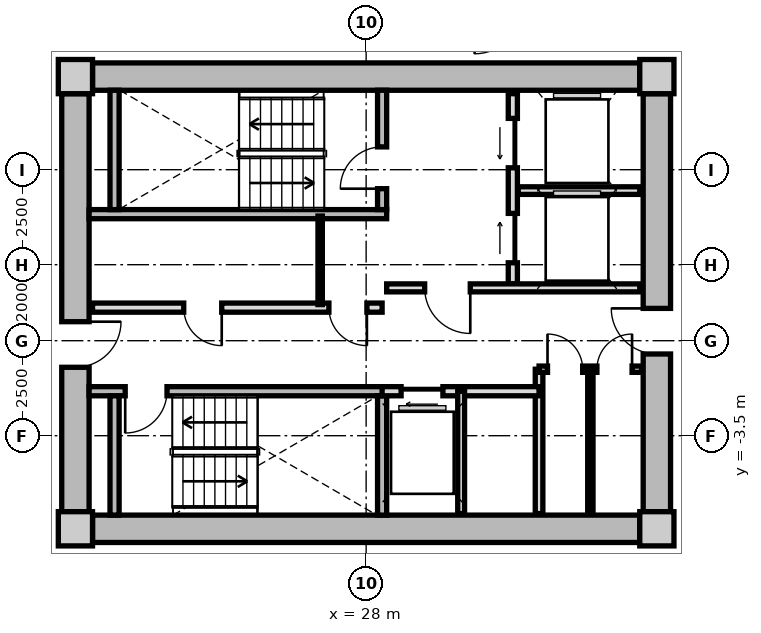
"""IFC4 building model, lengths in metres.
Left out: names, types, materials, properties, quantities, classifications, styles, units other than length and angle.
Written with IfcOpenShell. Run it as: python <this file> out.ifc"""

import sys

from ifc_helpers import new_model, si_unit, direction, frame, frame_2d, origin, origin_2d, place, context, subcontext, project, spatial, rectangle, extrude, source, transform, mapped, element, fill, save


model = new_model("IFC4")
c1 = context("Model", 3, precision=1e-05, world=origin(), true_north=direction((0.0, 1.0)))
c2 = subcontext(c1, "Body", "Model", "MODEL_VIEW")
j1 = project(units=[si_unit("LENGTHUNIT", "METRE"), si_unit("PLANEANGLEUNIT", "RADIAN")], contexts=[c1])
p1 = place(None, origin())
s1 = spatial("IfcSite", under=j1, at=p1, CompositionType="ELEMENT")
p2 = place(p1, origin())
s2 = spatial("IfcBuilding", under=s1, at=p2, CompositionType="ELEMENT")
p3 = place(p2, frame((0.0, 0.0, 123.7)))
s3 = spatial("IfcBuildingStorey", under=s2, at=p3, CompositionType="ELEMENT", Elevation=123.7)
m1 = source(origin(), c2, "Body", "SweptSolid", [
    extrude(rectangle(XDim=0.9, YDim=0.9, at=origin_2d()), origin(), (0.0, 0.0, 1.0), 3.05),
])
for number, where, z_axis, x_axis in (
    (1, (20.35, -5.95, 0.0), (0.0, 0.0, 1.0), (1.0, 0.0, 0.0)),
    (2, (35.65, -5.95, 0.0), (0.0, 0.0, 1.0), (1.0, 0.0, 0.0)),
    (3, (35.65, 5.95, 0.0), (0.0, 0.0, 1.0), (1.0, 0.0, 0.0)),
    (4, (20.35, 5.95, 0.0), (0.0, 0.0, 1.0), (1.0, 0.0, 0.0)),
):
    element("IfcColumn", number, at=place(p3, frame(where, z_axis=z_axis, x_axis=x_axis)), inside=s3, PredefinedType="COLUMN", context=c2, shape_type="MappedRepresentation", body=[
        mapped(m1, transform((0.0, 0.0, 0.0), x_axis=(1.0, 0.0, 0.0), y_axis=(0.0, 1.0, 0.0), z_axis=(0.0, 0.0, 1.0), scale=1.0)),
    ])
m2 = source(origin(), c2, "Body", "SweptSolid", [
    extrude(rectangle(XDim=14.4, YDim=0.72, at=frame_2d((7.2, 0.0))), origin(), (0.0, 0.0, 1.0), 2.79),
])
for number, where, z_axis, x_axis in (
    (5, (20.8, 5.95, 0.0), (0.0, 0.0, 1.0), (1.0, 0.0, 0.0)),
    (6, (35.2, -5.95, 0.0), (0.0, 0.0, 1.0), (-1.0, 0.0, 0.0)),
):
    element("IfcWall", number, at=place(p3, frame(where, z_axis=z_axis, x_axis=x_axis)), inside=s3, PredefinedType="SHEAR", context=c2, shape_type="MappedRepresentation", body=[
        mapped(m2, transform((0.0, 0.0, 0.0), x_axis=(1.0, 0.0, 0.0), y_axis=(0.0, 1.0, 0.0), z_axis=(0.0, 0.0, 1.0), scale=1.0)),
    ])
m3 = source(origin(), c2, "Body", "SweptSolid", [
    extrude(rectangle(XDim=11.0, YDim=0.72, at=frame_2d((5.5, 0.0))), origin(), (0.0, 0.0, 1.0), 2.79),
])
p4 = place(p3, frame((20.35, -5.5, 0.0), z_axis=(0.0, 0.0, 1.0), x_axis=(0.0, 1.0, 0.0)))
e7 = element("IfcWall", 7, at=p4, inside=s3, PredefinedType="SHEAR", context=c2, shape_type="MappedRepresentation", body=[
    mapped(m3, transform((0.0, 0.0, 0.0), x_axis=(1.0, 0.0, 0.0), y_axis=(0.0, 1.0, 0.0), z_axis=(0.0, 0.0, 1.0), scale=1.0)),
])
p5 = place(p4, frame((3.8, 0.0, 0.0)))
e8 = element("IfcOpeningElement", 8, at=p5, cuts=e7, PredefinedType="OPENING", context=c2, shape_type="SweptSolid", body=[
    extrude(rectangle(XDim=1.2, YDim=2.15, at=frame_2d((0.6, 1.075))), frame((0.0, 0.37, 0.0), z_axis=(0.0, -1.0, 0.0), x_axis=(1.0, 0.0, 0.0)), (0.0, 0.0, 1.0), 0.74),
])
p6 = place(p3, frame((35.65, 5.5, 0.0), z_axis=(0.0, 0.0, 1.0), x_axis=(0.0, -1.0, 0.0)))
e9 = element("IfcWall", 9, at=p6, inside=s3, PredefinedType="SHEAR", context=c2, shape_type="MappedRepresentation", body=[
    mapped(m3, transform((0.0, 0.0, 0.0), x_axis=(1.0, 0.0, 0.0), y_axis=(0.0, 1.0, 0.0), z_axis=(0.0, 0.0, 1.0), scale=1.0)),
])
p7 = place(p6, frame((5.65, 0.0, 0.0)))
e10 = element("IfcOpeningElement", 10, at=p7, cuts=e9, PredefinedType="OPENING", context=c2, shape_type="SweptSolid", body=[
    extrude(rectangle(XDim=1.2, YDim=2.15, at=frame_2d((0.6, 1.075))), frame((0.0, 0.37, 0.0), z_axis=(0.0, -1.0, 0.0), x_axis=(1.0, 0.0, 0.0)), (0.0, 0.0, 1.0), 0.74),
])
m4 = source(origin(), c2, "Body", "SweptSolid", [
    extrude(rectangle(XDim=7.83, YDim=0.24, at=frame_2d((3.915, 0.0))), origin(), (0.0, 0.0, 1.0), 2.79),
])
p8 = place(p3, frame((20.71, 2.33, 0.0), z_axis=(0.0, 0.0, 1.0), x_axis=(1.0, 0.0, 0.0)))
e11 = element("IfcWall", 11, at=p8, inside=s3, PredefinedType="PARTITIONING", context=c2, shape_type="MappedRepresentation", body=[
    mapped(m4, transform((0.0, 0.0, 0.0), x_axis=(1.0, 0.0, 0.0), y_axis=(0.0, 1.0, 0.0), z_axis=(0.0, 0.0, 1.0), scale=1.0)),
])
m5 = source(origin(), c2, "Body", "SweptSolid", [
    extrude(rectangle(XDim=3.14, YDim=0.24, at=frame_2d((1.57, 0.0))), origin(), (0.0, 0.0, 1.0), 2.79),
])
p9 = place(p3, frame((21.38, 2.45, 0.0), z_axis=(0.0, 0.0, 1.0), x_axis=(0.0, 1.0, 0.0)))
e12 = element("IfcWall", 12, at=p9, inside=s3, PredefinedType="PARTITIONING", context=c2, shape_type="MappedRepresentation", body=[
    mapped(m5, transform((0.0, 0.0, 0.0), x_axis=(1.0, 0.0, 0.0), y_axis=(0.0, 1.0, 0.0), z_axis=(0.0, 0.0, 1.0), scale=1.0)),
])
p10 = place(p3, frame((28.42, 2.45, 0.0), z_axis=(0.0, 0.0, 1.0), x_axis=(0.0, 1.0, 0.0)))
e13 = element("IfcWall", 13, at=p10, inside=s3, PredefinedType="PARTITIONING", context=c2, shape_type="MappedRepresentation", body=[
    mapped(m5, transform((0.0, 0.0, 0.0), x_axis=(1.0, 0.0, 0.0), y_axis=(0.0, 1.0, 0.0), z_axis=(0.0, 0.0, 1.0), scale=1.0)),
])
p11 = place(p10, frame((0.55, 0.0, 0.0)))
e14 = element("IfcOpeningElement", 14, at=p11, cuts=e13, PredefinedType="OPENING", context=c2, shape_type="SweptSolid", body=[
    extrude(rectangle(XDim=1.1, YDim=2.15, at=frame_2d((0.55, 1.075))), frame((0.0, 0.13, 0.0), z_axis=(0.0, -1.0, 0.0), x_axis=(1.0, 0.0, 0.0)), (0.0, 0.0, 1.0), 0.26),
])
p12 = place(p3, frame((20.71, -2.33, 0.0), z_axis=(0.0, 0.0, 1.0), x_axis=(1.0, 0.0, 0.0)))
e15 = element("IfcWall", 15, at=p12, inside=s3, PredefinedType="PARTITIONING", context=c2, shape_type="MappedRepresentation", body=[
    mapped(m4, transform((0.0, 0.0, 0.0), x_axis=(1.0, 0.0, 0.0), y_axis=(0.0, 1.0, 0.0), z_axis=(0.0, 0.0, 1.0), scale=1.0)),
])
p13 = place(p12, frame((0.95, 0.0, 0.0)))
e16 = element("IfcOpeningElement", 16, at=p13, cuts=e15, PredefinedType="OPENING", context=c2, shape_type="SweptSolid", body=[
    extrude(rectangle(XDim=1.1, YDim=2.15, at=frame_2d((0.55, 1.075))), frame((0.0, 0.13, 0.0), z_axis=(0.0, -1.0, 0.0), x_axis=(1.0, 0.0, 0.0)), (0.0, 0.0, 1.0), 0.26),
])
for number, where, z_axis, x_axis in (
    (17, (21.38, -5.59, 0.0), (0.0, 0.0, 1.0), (0.0, 1.0, 0.0)),
    (18, (28.42, -5.59, 0.0), (0.0, 0.0, 1.0), (0.0, 1.0, 0.0)),
):
    element("IfcWall", number, at=place(p3, frame(where, z_axis=z_axis, x_axis=x_axis)), inside=s3, PredefinedType="PARTITIONING", context=c2, shape_type="MappedRepresentation", body=[
        mapped(m5, transform((0.0, 0.0, 0.0), x_axis=(1.0, 0.0, 0.0), y_axis=(0.0, 1.0, 0.0), z_axis=(0.0, 0.0, 1.0), scale=1.0)),
    ])
m6 = source(origin(), c2, "Body", "SweptSolid", [
    extrude(rectangle(XDim=5.0, YDim=0.24, at=frame_2d((2.5, 0.0))), origin(), (0.0, 0.0, 1.0), 2.775),
])
p14 = place(p3, frame((31.86, 0.5, 0.0), z_axis=(0.0, 0.0, 1.0), x_axis=(0.0, 1.0, 0.0)))
e19 = element("IfcWall", 19, at=p14, inside=s3, PredefinedType="PARTITIONING", context=c2, shape_type="MappedRepresentation", body=[
    mapped(m6, transform((0.0, 0.0, 0.0), x_axis=(1.0, 0.0, 0.0), y_axis=(0.0, 1.0, 0.0), z_axis=(0.0, 0.0, 1.0), scale=1.0)),
])
p15 = place(p14, frame((3.05, 0.0, 0.0)))
e20 = element("IfcOpeningElement", 20, at=p15, cuts=e19, PredefinedType="OPENING", context=c2, shape_type="SweptSolid", body=[
    extrude(rectangle(XDim=1.3, YDim=2.2, at=frame_2d((0.65, 1.1))), frame((0.0, 0.13, 0.0), z_axis=(0.0, -1.0, 0.0), x_axis=(1.0, 0.0, 0.0)), (0.0, 0.0, 1.0), 0.26),
])
p16 = place(p14, frame((0.55, 0.0, 0.0)))
e21 = element("IfcOpeningElement", 21, at=p16, cuts=e19, PredefinedType="OPENING", context=c2, shape_type="SweptSolid", body=[
    extrude(rectangle(XDim=1.3, YDim=2.2, at=frame_2d((0.65, 1.1))), frame((0.0, 0.13, 0.0), z_axis=(0.0, -1.0, 0.0), x_axis=(1.0, 0.0, 0.0)), (0.0, 0.0, 1.0), 0.26),
])
m7 = source(origin(), c2, "Body", "SweptSolid", [
    extrude(rectangle(XDim=3.2, YDim=0.2, at=frame_2d((1.6, 0.0))), origin(), (0.0, 0.0, 1.0), 2.775),
])
p17 = place(p3, frame((32.0, 2.95, 0.0), z_axis=(0.0, 0.0, 1.0), x_axis=(1.0, 0.0, 0.0)))
e22 = element("IfcWall", 22, at=p17, inside=s3, PredefinedType="PARTITIONING", context=c2, shape_type="MappedRepresentation", body=[
    mapped(m7, transform((0.0, 0.0, 0.0), x_axis=(1.0, 0.0, 0.0), y_axis=(0.0, 1.0, 0.0), z_axis=(0.0, 0.0, 1.0), scale=1.0)),
])
m8 = source(origin(), c2, "Body", "SweptSolid", [
    extrude(rectangle(XDim=6.66, YDim=0.21, at=frame_2d((3.33, 0.0))), origin(), (0.0, 0.0, 1.0), 2.775),
])
p18 = place(p3, frame((28.54, 0.39, 0.0), z_axis=(0.0, 0.0, 1.0), x_axis=(1.0, 0.0, 0.0)))
e23 = element("IfcWall", 23, at=p18, inside=s3, PredefinedType="PARTITIONING", context=c2, shape_type="MappedRepresentation", body=[
    mapped(m8, transform((0.0, 0.0, 0.0), x_axis=(1.0, 0.0, 0.0), y_axis=(0.0, 1.0, 0.0), z_axis=(0.0, 0.0, 1.0), scale=1.0)),
])
p19 = place(p18, frame((1.0, 0.0, 0.0)))
e24 = element("IfcOpeningElement", 24, at=p19, cuts=e23, PredefinedType="OPENING", context=c2, shape_type="SweptSolid", body=[
    extrude(rectangle(XDim=1.2, YDim=2.15, at=frame_2d((0.6, 1.075))), frame((0.0, 0.115, 0.0), z_axis=(0.0, -1.0, 0.0), x_axis=(1.0, 0.0, 0.0)), (0.0, 0.0, 1.0), 0.23),
])
m9 = source(origin(), c2, "Body", "SweptSolid", [
    extrude(rectangle(XDim=7.62, YDim=0.24, at=frame_2d((3.81, 0.0))), origin(), (0.0, 0.0, 1.0), 2.775),
])
p20 = place(p3, frame((20.8, -0.13, 0.0), z_axis=(0.0, 0.0, 1.0), x_axis=(1.0, 0.0, 0.0)))
e25 = element("IfcWall", 25, at=p20, inside=s3, PredefinedType="PARTITIONING", context=c2, shape_type="MappedRepresentation", body=[
    mapped(m9, transform((0.0, 0.0, 0.0), x_axis=(1.0, 0.0, 0.0), y_axis=(0.0, 1.0, 0.0), z_axis=(0.0, 0.0, 1.0), scale=1.0)),
])
p21 = place(p20, frame((6.22, 0.0, 0.0)))
e26 = element("IfcOpeningElement", 26, at=p21, cuts=e25, PredefinedType="OPENING", context=c2, shape_type="SweptSolid", body=[
    extrude(rectangle(XDim=1.0, YDim=2.1, at=frame_2d((0.5, 1.05))), frame((0.0, 0.13, 0.0), z_axis=(0.0, -1.0, 0.0), x_axis=(1.0, 0.0, 0.0)), (0.0, 0.0, 1.0), 0.26),
])
p22 = place(p20, frame((2.4, 0.0, 0.0)))
e27 = element("IfcOpeningElement", 27, at=p22, cuts=e25, PredefinedType="OPENING", context=c2, shape_type="SweptSolid", body=[
    extrude(rectangle(XDim=1.0, YDim=2.1, at=frame_2d((0.5, 1.05))), frame((0.0, 0.13, 0.0), z_axis=(0.0, -1.0, 0.0), x_axis=(1.0, 0.0, 0.0)), (0.0, 0.0, 1.0), 0.26),
])
m10 = source(origin(), c2, "Body", "SweptSolid", [
    extrude(rectangle(XDim=2.33, YDim=0.115, at=frame_2d((1.165, 0.0))), origin(), (0.0, 0.0, 1.0), 2.775),
])
p23 = place(p3, frame((26.79, -0.05, 0.0), z_axis=(0.0, 0.0, 1.0), x_axis=(0.0, 1.0, 0.0)))
e28 = element("IfcWall", 28, at=p23, inside=s3, PredefinedType="PARTITIONING", context=c2, shape_type="MappedRepresentation", body=[
    mapped(m10, transform((0.0, 0.0, 0.0), x_axis=(1.0, 0.0, 0.0), y_axis=(0.0, 1.0, 0.0), z_axis=(0.0, 0.0, 1.0), scale=1.0)),
])
m11 = source(origin(), c2, "Body", "SweptSolid", [
    extrude(rectangle(XDim=3.8, YDim=0.2, at=frame_2d((1.9, 0.0))), origin(), (0.0, 0.0, 1.0), 2.775),
])
p24 = place(p3, frame((32.55, -5.55, 0.0), z_axis=(0.0, 0.0, 1.0), x_axis=(0.0, 1.0, 0.0)))
e29 = element("IfcWall", 29, at=p24, inside=s3, PredefinedType="PARTITIONING", context=c2, shape_type="MappedRepresentation", body=[
    mapped(m11, transform((0.0, 0.0, 0.0), x_axis=(1.0, 0.0, 0.0), y_axis=(0.0, 1.0, 0.0), z_axis=(0.0, 0.0, 1.0), scale=1.0)),
])
m12 = source(origin(), c2, "Body", "SweptSolid", [
    extrude(rectangle(XDim=4.13, YDim=0.24, at=frame_2d((2.065, 0.0))), origin(), (0.0, 0.0, 1.0), 2.775),
])
p25 = place(p3, frame((28.42, -2.33, 0.0), z_axis=(0.0, 0.0, 1.0), x_axis=(1.0, 0.0, 0.0)))
e30 = element("IfcWall", 30, at=p25, inside=s3, PredefinedType="PARTITIONING", context=c2, shape_type="MappedRepresentation", body=[
    mapped(m12, transform((0.0, 0.0, 0.0), x_axis=(1.0, 0.0, 0.0), y_axis=(0.0, 1.0, 0.0), z_axis=(0.0, 0.0, 1.0), scale=1.0)),
])
p26 = place(p25, frame((0.5, 0.0, 0.0)))
e31 = element("IfcOpeningElement", 31, at=p26, cuts=e30, PredefinedType="OPENING", context=c2, shape_type="SweptSolid", body=[
    extrude(rectangle(XDim=1.1, YDim=2.2, at=frame_2d((0.55, 1.1))), frame((0.0, 0.13, 0.0), z_axis=(0.0, -1.0, 0.0), x_axis=(1.0, 0.0, 0.0)), (0.0, 0.0, 1.0), 0.26),
])
m13 = source(origin(), c2, "Body", "SweptSolid", [
    extrude(rectangle(XDim=3.22, YDim=0.18, at=frame_2d((1.61, 0.0))), origin(), (0.0, 0.0, 1.0), 2.775),
])
p27 = place(p3, frame((30.5, -5.55, 0.0), z_axis=(0.0, 0.0, 1.0), x_axis=(0.0, 1.0, 0.0)))
e32 = element("IfcWall", 32, at=p27, inside=s3, PredefinedType="PARTITIONING", context=c2, shape_type="MappedRepresentation", body=[
    mapped(m13, transform((0.0, 0.0, 0.0), x_axis=(1.0, 0.0, 0.0), y_axis=(0.0, 1.0, 0.0), z_axis=(0.0, 0.0, 1.0), scale=1.0)),
])
m14 = source(origin(), c2, "Body", "SweptSolid", [
    extrude(rectangle(XDim=2.7, YDim=0.165, at=frame_2d((1.35, 0.0))), origin(), (0.0, 0.0, 1.0), 2.775),
])
p28 = place(p3, frame((32.55, -1.75, 0.0), z_axis=(0.0, 0.0, 1.0), x_axis=(1.0, 0.0, 0.0)))
e33 = element("IfcWall", 33, at=p28, inside=s3, PredefinedType="PARTITIONING", context=c2, shape_type="MappedRepresentation", body=[
    mapped(m14, transform((0.0, 0.0, 0.0), x_axis=(1.0, 0.0, 0.0), y_axis=(0.0, 1.0, 0.0), z_axis=(0.0, 0.0, 1.0), scale=1.0)),
])
p29 = place(p28, frame((0.222, 0.0, 0.0)))
e34 = element("IfcOpeningElement", 34, at=p29, cuts=e33, PredefinedType="OPENING", context=c2, shape_type="SweptSolid", body=[
    extrude(rectangle(XDim=0.925, YDim=2.1, at=frame_2d((0.462, 1.05))), frame((0.0, 0.093, 0.0), z_axis=(0.0, -1.0, 0.0), x_axis=(1.0, 0.0, 0.0)), (0.0, 0.0, 1.0), 0.185),
])
p30 = place(p28, frame((1.522, 0.0, 0.0)))
e35 = element("IfcOpeningElement", 35, at=p30, cuts=e33, PredefinedType="OPENING", context=c2, shape_type="SweptSolid", body=[
    extrude(rectangle(XDim=0.925, YDim=2.1, at=frame_2d((0.462, 1.05))), frame((0.0, 0.093, 0.0), z_axis=(0.0, -1.0, 0.0), x_axis=(1.0, 0.0, 0.0)), (0.0, 0.0, 1.0), 0.185),
])
m15 = source(origin(), c2, "Body", "SweptSolid", [
    extrude(rectangle(XDim=3.8, YDim=0.14, at=frame_2d((1.9, 0.0))), origin(), (0.0, 0.0, 1.0), 2.775),
])
p31 = place(p3, frame((33.9, -5.55, 0.0), z_axis=(0.0, 0.0, 1.0), x_axis=(0.0, 1.0, 0.0)))
e36 = element("IfcWall", 36, at=p31, inside=s3, PredefinedType="PARTITIONING", context=c2, shape_type="MappedRepresentation", body=[
    mapped(m15, transform((0.0, 0.0, 0.0), x_axis=(1.0, 0.0, 0.0), y_axis=(0.0, 1.0, 0.0), z_axis=(0.0, 0.0, 1.0), scale=1.0)),
])
m16 = source(origin(), c2, "Body", "SweptSolid", [
    extrude(rectangle(XDim=1.1, YDim=2.15, at=frame_2d((0.55, 1.075))), frame((0.0, 0.025, 0.0), z_axis=(0.0, -1.0, 0.0), x_axis=(1.0, 0.0, 0.0)), (0.0, 0.0, 1.0), 0.05),
])
p32 = place(p11, origin())
e37 = element("IfcDoor", 37, at=p32, inside=s3, OperationType="SINGLE_SWING_LEFT", PredefinedType="DOOR", context=c2, shape_type="MappedRepresentation", body=[
    mapped(m16, transform((0.0, 0.0, 0.0), x_axis=(1.0, 0.0, 0.0), y_axis=(0.0, 1.0, 0.0), z_axis=(0.0, 0.0, 1.0), scale=1.0)),
])
fill(e14, e37)
p33 = place(p13, frame((1.1, 0.0, 0.0), z_axis=(0.0, 0.0, 1.0), x_axis=(-1.0, 0.0, 0.0)))
e38 = element("IfcDoor", 38, at=p33, inside=s3, OperationType="SINGLE_SWING_RIGHT", PredefinedType="DOOR", context=c2, shape_type="MappedRepresentation", body=[
    mapped(m16, transform((0.0, 0.0, 0.0), x_axis=(1.0, 0.0, 0.0), y_axis=(0.0, 1.0, 0.0), z_axis=(0.0, 0.0, 1.0), scale=1.0)),
])
fill(e16, e38)
m17 = source(origin(), c2, "Body", "SweptSolid", [
    extrude(rectangle(XDim=1.3, YDim=2.2, at=frame_2d((0.65, 1.1))), frame((0.0, 0.025, 0.0), z_axis=(0.0, -1.0, 0.0), x_axis=(1.0, 0.0, 0.0)), (0.0, 0.0, 1.0), 0.05),
])
p34 = place(p15, origin())
e39 = element("IfcDoor", 39, at=p34, inside=s3, OperationType="SLIDING_TO_LEFT", PredefinedType="DOOR", context=c2, shape_type="MappedRepresentation", body=[
    mapped(m17, transform((0.0, 0.0, 0.0), x_axis=(1.0, 0.0, 0.0), y_axis=(0.0, 1.0, 0.0), z_axis=(0.0, 0.0, 1.0), scale=1.0)),
])
fill(e20, e39)
p35 = place(p16, origin())
e40 = element("IfcDoor", 40, at=p35, inside=s3, OperationType="SLIDING_TO_RIGHT", PredefinedType="DOOR", context=c2, shape_type="MappedRepresentation", body=[
    mapped(m17, transform((0.0, 0.0, 0.0), x_axis=(1.0, 0.0, 0.0), y_axis=(0.0, 1.0, 0.0), z_axis=(0.0, 0.0, 1.0), scale=1.0)),
])
fill(e21, e40)
m18 = source(origin(), c2, "Body", "SweptSolid", [
    extrude(rectangle(XDim=1.2, YDim=2.15, at=frame_2d((0.6, 1.075))), frame((0.0, 0.025, 0.0), z_axis=(0.0, -1.0, 0.0), x_axis=(1.0, 0.0, 0.0)), (0.0, 0.0, 1.0), 0.05),
])
p36 = place(p19, frame((1.2, 0.0, 0.0), z_axis=(0.0, 0.0, 1.0), x_axis=(-1.0, 0.0, 0.0)))
e41 = element("IfcDoor", 41, at=p36, inside=s3, OperationType="SINGLE_SWING_LEFT", PredefinedType="DOOR", context=c2, shape_type="MappedRepresentation", body=[
    mapped(m18, transform((0.0, 0.0, 0.0), x_axis=(1.0, 0.0, 0.0), y_axis=(0.0, 1.0, 0.0), z_axis=(0.0, 0.0, 1.0), scale=1.0)),
])
fill(e24, e41)
p37 = place(p5, frame((1.2, 0.0, 0.0), z_axis=(0.0, 0.0, 1.0), x_axis=(-1.0, 0.0, 0.0)))
e42 = element("IfcDoor", 42, at=p37, inside=s3, OperationType="SINGLE_SWING_LEFT", PredefinedType="DOOR", context=c2, shape_type="MappedRepresentation", body=[
    mapped(m18, transform((0.0, 0.0, 0.0), x_axis=(1.0, 0.0, 0.0), y_axis=(0.0, 1.0, 0.0), z_axis=(0.0, 0.0, 1.0), scale=1.0)),
])
fill(e8, e42)
p38 = place(p7, frame((1.2, 0.0, 0.0), z_axis=(0.0, 0.0, 1.0), x_axis=(-1.0, 0.0, 0.0)))
e43 = element("IfcDoor", 43, at=p38, inside=s3, OperationType="SINGLE_SWING_RIGHT", PredefinedType="DOOR", context=c2, shape_type="MappedRepresentation", body=[
    mapped(m18, transform((0.0, 0.0, 0.0), x_axis=(1.0, 0.0, 0.0), y_axis=(0.0, 1.0, 0.0), z_axis=(0.0, 0.0, 1.0), scale=1.0)),
])
fill(e10, e43)
m19 = source(origin(), c2, "Body", "SweptSolid", [
    extrude(rectangle(XDim=1.0, YDim=2.1, at=frame_2d((0.5, 1.05))), frame((0.0, 0.025, 0.0), z_axis=(0.0, -1.0, 0.0), x_axis=(1.0, 0.0, 0.0)), (0.0, 0.0, 1.0), 0.05),
])
p39 = place(p21, frame((1.0, 0.0, 0.0), z_axis=(0.0, 0.0, 1.0), x_axis=(-1.0, 0.0, 0.0)))
e44 = element("IfcDoor", 44, at=p39, inside=s3, OperationType="SINGLE_SWING_LEFT", PredefinedType="DOOR", context=c2, shape_type="MappedRepresentation", body=[
    mapped(m19, transform((0.0, 0.0, 0.0), x_axis=(1.0, 0.0, 0.0), y_axis=(0.0, 1.0, 0.0), z_axis=(0.0, 0.0, 1.0), scale=1.0)),
])
fill(e26, e44)
p40 = place(p22, frame((1.0, 0.0, 0.0), z_axis=(0.0, 0.0, 1.0), x_axis=(-1.0, 0.0, 0.0)))
e45 = element("IfcDoor", 45, at=p40, inside=s3, OperationType="SINGLE_SWING_LEFT", PredefinedType="DOOR", context=c2, shape_type="MappedRepresentation", body=[
    mapped(m19, transform((0.0, 0.0, 0.0), x_axis=(1.0, 0.0, 0.0), y_axis=(0.0, 1.0, 0.0), z_axis=(0.0, 0.0, 1.0), scale=1.0)),
])
fill(e27, e45)
m20 = source(origin(), c2, "Body", "SweptSolid", [
    extrude(rectangle(XDim=1.1, YDim=2.2, at=frame_2d((0.55, 1.1))), frame((0.0, 0.025, 0.0), z_axis=(0.0, -1.0, 0.0), x_axis=(1.0, 0.0, 0.0)), (0.0, 0.0, 1.0), 0.05),
])
p41 = place(p26, frame((1.1, 0.0, 0.0), z_axis=(0.0, 0.0, 1.0), x_axis=(-1.0, 0.0, 0.0)))
e46 = element("IfcDoor", 46, at=p41, inside=s3, OperationType="SLIDING_TO_LEFT", PredefinedType="DOOR", context=c2, shape_type="MappedRepresentation", body=[
    mapped(m20, transform((0.0, 0.0, 0.0), x_axis=(1.0, 0.0, 0.0), y_axis=(0.0, 1.0, 0.0), z_axis=(0.0, 0.0, 1.0), scale=1.0)),
])
fill(e31, e46)
m21 = source(origin(), c2, "Body", "SweptSolid", [
    extrude(rectangle(XDim=0.925, YDim=2.1, at=frame_2d((0.462, 1.05))), frame((0.0, 0.025, 0.0), z_axis=(0.0, -1.0, 0.0), x_axis=(1.0, 0.0, 0.0)), (0.0, 0.0, 1.0), 0.05),
])
p42 = place(p29, origin())
e47 = element("IfcDoor", 47, at=p42, inside=s3, OperationType="SINGLE_SWING_LEFT", PredefinedType="DOOR", context=c2, shape_type="MappedRepresentation", body=[
    mapped(m21, transform((0.0, 0.0, 0.0), x_axis=(1.0, 0.0, 0.0), y_axis=(0.0, 1.0, 0.0), z_axis=(0.0, 0.0, 1.0), scale=1.0)),
])
fill(e34, e47)
p43 = place(p30, origin())
e48 = element("IfcDoor", 48, at=p43, inside=s3, OperationType="SINGLE_SWING_RIGHT", PredefinedType="DOOR", context=c2, shape_type="MappedRepresentation", body=[
    mapped(m21, transform((0.0, 0.0, 0.0), x_axis=(1.0, 0.0, 0.0), y_axis=(0.0, 1.0, 0.0), z_axis=(0.0, 0.0, 1.0), scale=1.0)),
])
fill(e35, e48)
save(model, sys.argv[1])
